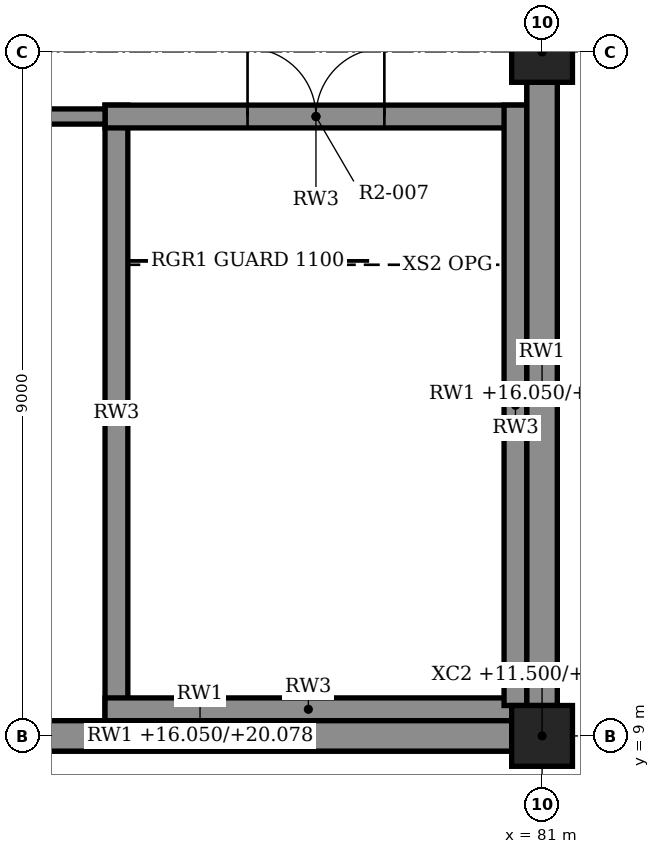
"""IFC4 building model, lengths in metres.
Left out: names, types, materials, properties, quantities, classifications, styles, units other than length and angle.
Written with IfcOpenShell. Run it as: python <this file> out.ifc"""

import sys

from ifc_helpers import new_model, si_unit, direction, frame, frame_2d, origin, origin_2d, place, context, subcontext, project, spatial, polyline, rectangle, outline, extrude, element, fill, save


model = new_model("IFC4")
c1 = context("Model", 3, precision=1e-05, world=origin(), true_north=direction((0.0, 1.0)))
c2 = subcontext(c1, "Body", "Model", "MODEL_VIEW")
j1 = project(units=[si_unit("LENGTHUNIT", "METRE"), si_unit("PLANEANGLEUNIT", "RADIAN")], contexts=[c1])
p1 = place(None, origin())
s1 = spatial("IfcSite", under=j1, at=p1, CompositionType="ELEMENT")
p2 = place(p1, origin())
s2 = spatial("IfcBuilding", under=s1, at=p2, CompositionType="ELEMENT")
p3 = place(p2, frame((0.0, 0.0, 11.5)))
s3 = spatial("IfcBuildingStorey", under=s2, at=p3, CompositionType="ELEMENT", Elevation=11.5)
for number, where, z_axis, x_axis in (
    (1, (81.0, 9.0, 0.0), (0.0, 0.0, 1.0), (1.0, 0.0, 0.0)),
    (2, (81.0, 18.0, 0.0), (0.0, 0.0, 1.0), (1.0, 0.0, 0.0)),
):
    element("IfcColumn", number, at=place(p3, frame(where, z_axis=z_axis, x_axis=x_axis)), inside=s3, PredefinedType="COLUMN", context=c2, shape_type="SweptSolid", body=[
        extrude(rectangle(XDim=0.8, YDim=0.8, at=origin_2d()), origin(), (0.0, 0.0, 1.0), 4.67),
    ])
p4 = place(p3, frame((72.0, 9.0, 4.55), z_axis=(0.0, 0.0, 1.0), x_axis=(1.0, 0.0, 0.0)))
e3 = element("IfcWall", 3, at=p4, inside=s3, PredefinedType="SOLIDWALL", context=c2, shape_type="SweptSolid", body=[
    extrude(outline(polyline([(0.0, 0.0), (9.0, 0.0), (9.0, 4.028), (4.539, 1.55), (0.0, 1.55), (0.0, 0.0)])), frame((0.0, 0.2, 0.0), z_axis=(0.0, -1.0, 0.0), x_axis=(1.0, 0.0, 0.0)), (0.0, 0.0, 1.0), 0.4),
])
p5 = place(p3, frame((81.0, 9.0, 4.55), z_axis=(0.0, 0.0, 1.0), x_axis=(0.0, 1.0, 0.0)))
e4 = element("IfcWall", 4, at=p5, inside=s3, PredefinedType="SOLIDWALL", context=c2, shape_type="SweptSolid", body=[
    extrude(rectangle(XDim=9.0, YDim=0.4, at=frame_2d((4.5, 0.0))), origin(), (0.0, 0.0, 1.0), 4.028),
])
for number, where, z_axis, x_axis in (
    (5, (72.4, 9.0, 0.0), (0.0, 0.0, 1.0), (1.0, 0.0, 0.0)),
    (6, (81.0, 9.4, 0.0), (0.0, 0.0, 1.0), (0.0, 1.0, 0.0)),
):
    element("IfcWall", number, at=place(p3, frame(where, z_axis=z_axis, x_axis=x_axis)), inside=s3, PredefinedType="SOLIDWALL", context=c2, shape_type="SweptSolid", body=[
        extrude(rectangle(XDim=8.2, YDim=0.4, at=frame_2d((4.1, 0.0))), origin(), (0.0, 0.0, 1.0), 4.55),
    ])
p6 = place(p3, frame((80.6, 9.35, 0.0), z_axis=(0.0, 0.0, 1.0), x_axis=(-1.0, 0.0, 0.0)))
e7 = element("IfcWall", 7, at=p6, inside=s3, PredefinedType="SOLIDWALL", context=c2, shape_type="SweptSolid", body=[
    extrude(rectangle(XDim=5.35, YDim=0.3, at=frame_2d((2.675, 0.0))), origin(), (0.0, 0.0, 1.0), 4.3),
])
p7 = place(p3, frame((80.8, 17.15, 0.0), z_axis=(0.0, 0.0, 1.0), x_axis=(-1.0, 0.0, 0.0)))
e8 = element("IfcWall", 8, at=p7, inside=s3, PredefinedType="SOLIDWALL", context=c2, shape_type="SweptSolid", body=[
    extrude(rectangle(XDim=5.55, YDim=0.3, at=frame_2d((2.775, 0.0))), origin(), (0.0, 0.0, 1.0), 4.3),
])
p8 = place(p7, frame((1.875, 0.0, 0.0)))
e9 = element("IfcOpeningElement", 9, at=p8, cuts=e8, PredefinedType="OPENING", context=c2, shape_type="SweptSolid", body=[
    extrude(rectangle(XDim=1.8, YDim=2.4, at=frame_2d((0.9, 1.2))), frame((0.0, 0.16, 0.0), z_axis=(0.0, -1.0, 0.0), x_axis=(1.0, 0.0, 0.0)), (0.0, 0.0, 1.0), 0.32),
])
p9 = place(p3, frame((80.65, 9.4, 0.0), z_axis=(0.0, 0.0, 1.0), x_axis=(0.0, 1.0, 0.0)))
e10 = element("IfcWall", 10, at=p9, inside=s3, PredefinedType="SOLIDWALL", context=c2, shape_type="SweptSolid", body=[
    extrude(rectangle(XDim=7.9, YDim=0.3, at=frame_2d((3.95, 0.0))), origin(), (0.0, 0.0, 1.0), 4.3),
])
p10 = place(p3, frame((75.4, 9.2, 0.0), z_axis=(0.0, 0.0, 1.0), x_axis=(0.0, 1.0, 0.0)))
e11 = element("IfcWall", 11, at=p10, inside=s3, PredefinedType="SOLIDWALL", context=c2, shape_type="SweptSolid", body=[
    extrude(rectangle(XDim=8.1, YDim=0.3, at=frame_2d((4.05, 0.0))), origin(), (0.0, 0.0, 1.0), 4.3),
])
p11 = place(p3, frame((75.25, 17.15, 0.0), z_axis=(0.0, 0.0, 1.0), x_axis=(-1.0, 0.0, 0.0)))
e12 = element("IfcWall", 12, at=p11, inside=s3, PredefinedType="PARTITIONING", context=c2, shape_type="SweptSolid", body=[
    extrude(rectangle(XDim=6.85, YDim=0.2, at=frame_2d((3.425, 0.0))), origin(), (0.0, 0.0, 1.0), 4.3),
])
p12 = place(p11, frame((1.15, 0.0, 0.0)))
e13 = element("IfcOpeningElement", 13, at=p12, cuts=e12, PredefinedType="OPENING", context=c2, shape_type="SweptSolid", body=[
    extrude(rectangle(XDim=0.9, YDim=2.1, at=frame_2d((0.45, 1.05))), frame((0.0, 0.11, 0.0), z_axis=(0.0, -1.0, 0.0), x_axis=(1.0, 0.0, 0.0)), (0.0, 0.0, 1.0), 0.22),
])
p13 = place(p8, frame((1.8, 0.0, 0.0), z_axis=(0.0, 0.0, 1.0), x_axis=(-1.0, 0.0, 0.0)))
e14 = element("IfcDoor", 14, at=p13, inside=s3, OperationType="DOUBLE_DOOR_SINGLE_SWING", PredefinedType="DOOR", context=c2, shape_type="SweptSolid", body=[
    extrude(rectangle(XDim=1.8, YDim=2.4, at=frame_2d((0.9, 1.2))), frame((0.0, 0.025, 0.0), z_axis=(0.0, -1.0, 0.0), x_axis=(1.0, 0.0, 0.0)), (0.0, 0.0, 1.0), 0.05),
])
fill(e9, e14)
save(model, sys.argv[1])
